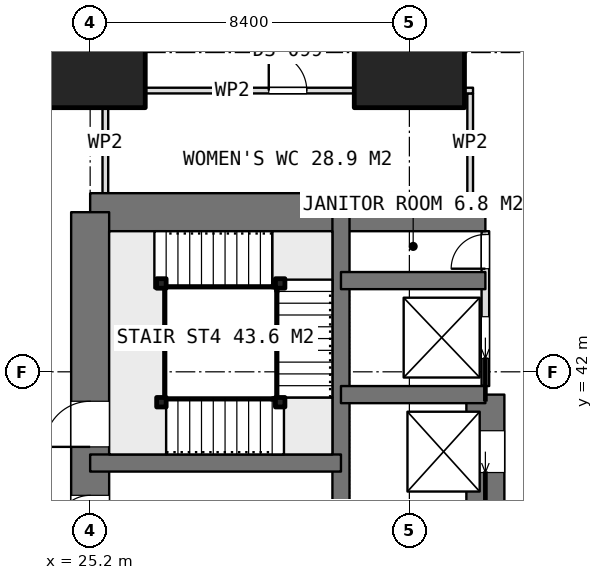
"""IFC4 building model, lengths in metres.
Left out: names, types, materials, properties, quantities, classifications, styles, units other than length and angle.
Written with IfcOpenShell. Run it as: python <this file> out.ifc"""

import sys

from ifc_helpers import new_model, si_unit, direction, frame, frame_2d, origin, origin_2d, place, context, subcontext, project, spatial, rectangle, extrude, element, fill, save


model = new_model("IFC4")
c1 = context("Model", 3, precision=1e-05, world=origin(), true_north=direction((0.0, 1.0)))
c2 = subcontext(c1, "Body", "Model", "MODEL_VIEW")
j1 = project(units=[si_unit("LENGTHUNIT", "METRE"), si_unit("PLANEANGLEUNIT", "RADIAN")], contexts=[c1])
p1 = place(None, origin())
s1 = spatial("IfcSite", under=j1, at=p1, CompositionType="ELEMENT")
p2 = place(p1, origin())
s2 = spatial("IfcBuilding", under=s1, at=p2, CompositionType="ELEMENT")
p3 = place(p2, frame((0.0, 0.0, 95.3)))
s3 = spatial("IfcBuildingStorey", under=s2, at=p3, CompositionType="ELEMENT", Elevation=95.3)
p4 = place(p3, frame((25.2, 46.2, 0.0), z_axis=(0.0, 0.0, 1.0), x_axis=(1.0, 0.0, 0.0)))
e1 = element("IfcWall", 1, at=p4, inside=s3, PredefinedType="SHEAR", context=c2, shape_type="SweptSolid", body=[
    extrude(rectangle(XDim=10.4, YDim=1.0, at=frame_2d((5.2, 0.0))), origin(), (0.0, 0.0, 1.0), 3.75),
])
p5 = place(p3, frame((25.2, 21.0, 0.0), z_axis=(0.0, 0.0, 1.0), x_axis=(0.0, 1.0, 0.0)))
e2 = element("IfcWall", 2, at=p5, inside=s3, PredefinedType="SHEAR", context=c2, shape_type="SweptSolid", body=[
    extrude(rectangle(XDim=25.2, YDim=1.0, at=frame_2d((12.6, 0.0))), origin(), (0.0, 0.0, 1.0), 3.75),
])
p6 = place(p5, frame((7.8, 0.0, 0.0)))
e3 = element("IfcOpeningElement", 3, at=p6, cuts=e2, PredefinedType="OPENING", context=c2, shape_type="SweptSolid", body=[
    extrude(rectangle(XDim=1.2, YDim=2.1, at=frame_2d((0.6, 1.05))), frame((0.0, 0.51, 0.0), z_axis=(0.0, -1.0, 0.0), x_axis=(1.0, 0.0, 0.0)), (0.0, 0.0, 1.0), 1.02),
])
p7 = place(p5, frame((14.25, 0.0, 0.0)))
e4 = element("IfcOpeningElement", 4, at=p7, cuts=e2, PredefinedType="OPENING", context=c2, shape_type="SweptSolid", body=[
    extrude(rectangle(XDim=0.9, YDim=2.1, at=frame_2d((0.45, 1.05))), frame((0.0, 0.51, 0.0), z_axis=(0.0, -1.0, 0.0), x_axis=(1.0, 0.0, 0.0)), (0.0, 0.0, 1.0), 1.02),
])
p8 = place(p5, frame((16.85, 0.0, 0.0)))
e5 = element("IfcOpeningElement", 5, at=p8, cuts=e2, PredefinedType="OPENING", context=c2, shape_type="SweptSolid", body=[
    extrude(rectangle(XDim=0.9, YDim=2.1, at=frame_2d((0.45, 1.05))), frame((0.0, 0.51, 0.0), z_axis=(0.0, -1.0, 0.0), x_axis=(1.0, 0.0, 0.0)), (0.0, 0.0, 1.0), 1.02),
])
p9 = place(p5, frame((19.025, 0.0, 0.0)))
e6 = element("IfcOpeningElement", 6, at=p9, cuts=e2, PredefinedType="OPENING", context=c2, shape_type="SweptSolid", body=[
    extrude(rectangle(XDim=1.2, YDim=2.1, at=frame_2d((0.6, 1.05))), frame((0.0, 0.51, 0.0), z_axis=(0.0, -1.0, 0.0), x_axis=(1.0, 0.0, 0.0)), (0.0, 0.0, 1.0), 1.02),
])
p10 = place(p3, frame((31.8, 21.0, 0.0), z_axis=(0.0, 0.0, 1.0), x_axis=(0.0, 1.0, 0.0)))
e7 = element("IfcWall", 7, at=p10, inside=s3, PredefinedType="SHEAR", context=c2, shape_type="SweptSolid", body=[
    extrude(rectangle(XDim=25.2, YDim=0.45, at=frame_2d((12.6, 0.0))), origin(), (0.0, 0.0, 1.0), 3.75),
])
p11 = place(p3, frame((35.6, 23.4, 0.0), z_axis=(0.0, 0.0, 1.0), x_axis=(0.0, 1.0, 0.0)))
e8 = element("IfcWall", 8, at=p11, inside=s3, PredefinedType="SHEAR", context=c2, shape_type="SweptSolid", body=[
    extrude(rectangle(XDim=18.0, YDim=1.0, at=frame_2d((9.0, 0.0))), origin(), (0.0, 0.0, 1.0), 3.75),
])
p12 = place(p11, frame((0.95, 0.0, 0.0)))
e9 = element("IfcOpeningElement", 9, at=p12, cuts=e8, PredefinedType="OPENING", context=c2, shape_type="SweptSolid", body=[
    extrude(rectangle(XDim=1.1, YDim=2.1, at=frame_2d((0.55, 1.05))), frame((0.0, 0.51, 0.0), z_axis=(0.0, -1.0, 0.0), x_axis=(1.0, 0.0, 0.0)), (0.0, 0.0, 1.0), 1.02),
])
p13 = place(p11, frame((3.95, 0.0, 0.0)))
e10 = element("IfcOpeningElement", 10, at=p13, cuts=e8, PredefinedType="OPENING", context=c2, shape_type="SweptSolid", body=[
    extrude(rectangle(XDim=1.1, YDim=2.1, at=frame_2d((0.55, 1.05))), frame((0.0, 0.51, 0.0), z_axis=(0.0, -1.0, 0.0), x_axis=(1.0, 0.0, 0.0)), (0.0, 0.0, 1.0), 1.02),
])
p14 = place(p11, frame((6.95, 0.0, 0.0)))
e11 = element("IfcOpeningElement", 11, at=p14, cuts=e8, PredefinedType="OPENING", context=c2, shape_type="SweptSolid", body=[
    extrude(rectangle(XDim=1.1, YDim=2.1, at=frame_2d((0.55, 1.05))), frame((0.0, 0.51, 0.0), z_axis=(0.0, -1.0, 0.0), x_axis=(1.0, 0.0, 0.0)), (0.0, 0.0, 1.0), 1.02),
])
p15 = place(p11, frame((9.95, 0.0, 0.0)))
e12 = element("IfcOpeningElement", 12, at=p15, cuts=e8, PredefinedType="OPENING", context=c2, shape_type="SweptSolid", body=[
    extrude(rectangle(XDim=1.1, YDim=2.1, at=frame_2d((0.55, 1.05))), frame((0.0, 0.51, 0.0), z_axis=(0.0, -1.0, 0.0), x_axis=(1.0, 0.0, 0.0)), (0.0, 0.0, 1.0), 1.02),
])
p16 = place(p11, frame((12.95, 0.0, 0.0)))
e13 = element("IfcOpeningElement", 13, at=p16, cuts=e8, PredefinedType="OPENING", context=c2, shape_type="SweptSolid", body=[
    extrude(rectangle(XDim=1.1, YDim=2.1, at=frame_2d((0.55, 1.05))), frame((0.0, 0.51, 0.0), z_axis=(0.0, -1.0, 0.0), x_axis=(1.0, 0.0, 0.0)), (0.0, 0.0, 1.0), 1.02),
])
p17 = place(p11, frame((15.95, 0.0, 0.0)))
e14 = element("IfcOpeningElement", 14, at=p17, cuts=e8, PredefinedType="OPENING", context=c2, shape_type="SweptSolid", body=[
    extrude(rectangle(XDim=1.1, YDim=2.1, at=frame_2d((0.55, 1.05))), frame((0.0, 0.51, 0.0), z_axis=(0.0, -1.0, 0.0), x_axis=(1.0, 0.0, 0.0)), (0.0, 0.0, 1.0), 1.02),
])
for number, where, z_axis, x_axis in (
    (15, (31.8, 41.4, 0.0), (0.0, 0.0, 1.0), (1.0, 0.0, 0.0)),
    (16, (31.8, 44.4, 0.0), (0.0, 0.0, 1.0), (1.0, 0.0, 0.0)),
):
    element("IfcWall", number, at=place(p3, frame(where, z_axis=z_axis, x_axis=x_axis)), inside=s3, PredefinedType="SHEAR", context=c2, shape_type="SweptSolid", body=[
        extrude(rectangle(XDim=3.8, YDim=0.45, at=frame_2d((1.9, 0.0))), origin(), (0.0, 0.0, 1.0), 3.75),
    ])
p18 = place(p3, frame((25.2, 39.6, 0.0), z_axis=(0.0, 0.0, 1.0), x_axis=(1.0, 0.0, 0.0)))
e17 = element("IfcWall", 17, at=p18, inside=s3, PredefinedType="SHEAR", context=c2, shape_type="SweptSolid", body=[
    extrude(rectangle(XDim=6.6, YDim=0.45, at=frame_2d((3.3, 0.0))), origin(), (0.0, 0.0, 1.0), 3.75),
])
for number, where, z_axis, x_axis in (
    (18, (25.2, 50.4, 0.0), (0.0, 0.0, 1.0), (1.0, 0.0, 0.0)),
    (19, (33.6, 50.4, 0.0), (0.0, 0.0, 1.0), (1.0, 0.0, 0.0)),
):
    element("IfcColumn", number, at=place(p3, frame(where, z_axis=z_axis, x_axis=x_axis)), inside=s3, PredefinedType="COLUMN", context=c2, shape_type="SweptSolid", body=[
        extrude(rectangle(XDim=2.9, YDim=2.9, at=origin_2d()), origin(), (0.0, 0.0, 1.0), 3.75),
    ])
p19 = place(p3, frame((35.6, 41.625, 0.0), z_axis=(0.0, 0.0, 1.0), x_axis=(0.0, 1.0, 0.0)))
e20 = element("IfcWall", 20, at=p19, inside=s3, PredefinedType="PARTITIONING", context=c2, shape_type="SweptSolid", body=[
    extrude(rectangle(XDim=4.075, YDim=0.2, at=frame_2d((2.038, 0.0))), origin(), (0.0, 0.0, 1.0), 3.5),
])
p20 = place(p19, frame((3.088, 0.0, 0.0)))
e21 = element("IfcOpeningElement", 21, at=p20, cuts=e20, PredefinedType="OPENING", context=c2, shape_type="SweptSolid", body=[
    extrude(rectangle(XDim=0.9, YDim=2.1, at=frame_2d((0.45, 1.05))), frame((0.0, 0.11, 0.0), z_axis=(0.0, -1.0, 0.0), x_axis=(1.0, 0.0, 0.0)), (0.0, 0.0, 1.0), 0.22),
])
p21 = place(p19, frame((0.725, 0.0, 0.0)))
e22 = element("IfcOpeningElement", 22, at=p21, cuts=e20, PredefinedType="OPENING", context=c2, shape_type="SweptSolid", body=[
    extrude(rectangle(XDim=1.1, YDim=2.1, at=frame_2d((0.55, 1.05))), frame((0.0, 0.11, 0.0), z_axis=(0.0, -1.0, 0.0), x_axis=(1.0, 0.0, 0.0)), (0.0, 0.0, 1.0), 0.22),
])
p22 = place(p3, frame((25.525, 49.4, 0.0), z_axis=(0.0, 0.0, 1.0), x_axis=(1.0, 0.0, 0.0)))
e23 = element("IfcWall", 23, at=p22, inside=s3, PredefinedType="PARTITIONING", context=c2, shape_type="SweptSolid", body=[
    extrude(rectangle(XDim=9.75, YDim=0.15, at=frame_2d((4.875, 0.0))), origin(), (0.0, 0.0, 1.0), 3.5),
])
p23 = place(p22, frame((4.375, 0.0, 0.0)))
e24 = element("IfcOpeningElement", 24, at=p23, cuts=e23, PredefinedType="OPENING", context=c2, shape_type="SweptSolid", body=[
    extrude(rectangle(XDim=1.0, YDim=2.1, at=frame_2d((0.5, 1.05))), frame((0.0, 0.085, 0.0), z_axis=(0.0, -1.0, 0.0), x_axis=(1.0, 0.0, 0.0)), (0.0, 0.0, 1.0), 0.17),
])
for number, where, z_axis, x_axis in (
    (25, (25.6, 46.7, 0.0), (0.0, 0.0, 1.0), (0.0, 1.0, 0.0)),
    (26, (35.2, 46.7, 0.0), (0.0, 0.0, 1.0), (0.0, 1.0, 0.0)),
):
    element("IfcWall", number, at=place(p3, frame(where, z_axis=z_axis, x_axis=x_axis)), inside=s3, PredefinedType="PARTITIONING", context=c2, shape_type="SweptSolid", body=[
        extrude(rectangle(XDim=2.625, YDim=0.15, at=frame_2d((1.312, 0.0))), origin(), (0.0, 0.0, 1.0), 3.5),
    ])
for number, where, z_axis, x_axis in (
    (27, (27.075, 41.2, 0.0), (0.0, 0.0, 1.0), (1.0, 0.0, 0.0)),
    (28, (30.2, 41.2, 0.0), (0.0, 0.0, 1.0), (1.0, 0.0, 0.0)),
    (29, (30.2, 44.325, 0.0), (0.0, 0.0, 1.0), (1.0, 0.0, 0.0)),
    (30, (27.075, 44.325, 0.0), (0.0, 0.0, 1.0), (1.0, 0.0, 0.0)),
):
    element("IfcColumn", number, at=place(p3, frame(where, z_axis=z_axis, x_axis=x_axis)), inside=s3, PredefinedType="COLUMN", context=c2, shape_type="SweptSolid", body=[
        extrude(rectangle(XDim=0.25, YDim=0.25, at=origin_2d()), origin(), (0.0, 0.0, 1.0), 3.75),
    ])
p24 = place(p8, origin())
e31 = element("IfcDoor", 31, at=p24, inside=s3, OperationType="SINGLE_SWING_LEFT", PredefinedType="DOOR", context=c2, shape_type="SweptSolid", body=[
    extrude(rectangle(XDim=0.9, YDim=2.1, at=frame_2d((0.45, 1.05))), frame((0.0, 0.025, 0.0), z_axis=(0.0, -1.0, 0.0), x_axis=(1.0, 0.0, 0.0)), (0.0, 0.0, 1.0), 0.05),
])
fill(e5, e31)
p25 = place(p20, origin())
e32 = element("IfcDoor", 32, at=p25, inside=s3, OperationType="SINGLE_SWING_LEFT", PredefinedType="DOOR", context=c2, shape_type="SweptSolid", body=[
    extrude(rectangle(XDim=0.9, YDim=2.1, at=frame_2d((0.45, 1.05))), frame((0.0, 0.025, 0.0), z_axis=(0.0, -1.0, 0.0), x_axis=(1.0, 0.0, 0.0)), (0.0, 0.0, 1.0), 0.05),
])
fill(e21, e32)
p26 = place(p17, origin())
e33 = element("IfcDoor", 33, at=p26, inside=s3, OperationType="SLIDING_TO_LEFT", PredefinedType="USERDEFINED", context=c2, shape_type="SweptSolid", body=[
    extrude(rectangle(XDim=1.1, YDim=2.1, at=frame_2d((0.55, 1.05))), frame((0.0, 0.025, 0.0), z_axis=(0.0, -1.0, 0.0), x_axis=(1.0, 0.0, 0.0)), (0.0, 0.0, 1.0), 0.05),
])
fill(e14, e33)
p27 = place(p21, origin())
e34 = element("IfcDoor", 34, at=p27, inside=s3, OperationType="SLIDING_TO_LEFT", PredefinedType="USERDEFINED", context=c2, shape_type="SweptSolid", body=[
    extrude(rectangle(XDim=1.1, YDim=2.1, at=frame_2d((0.55, 1.05))), frame((0.0, 0.025, 0.0), z_axis=(0.0, -1.0, 0.0), x_axis=(1.0, 0.0, 0.0)), (0.0, 0.0, 1.0), 0.05),
])
fill(e22, e34)
p28 = place(p23, origin())
e35 = element("IfcDoor", 35, at=p28, inside=s3, OperationType="SINGLE_SWING_LEFT", PredefinedType="DOOR", context=c2, shape_type="SweptSolid", body=[
    extrude(rectangle(XDim=1.0, YDim=2.1, at=frame_2d((0.5, 1.05))), frame((0.0, 0.025, 0.0), z_axis=(0.0, -1.0, 0.0), x_axis=(1.0, 0.0, 0.0)), (0.0, 0.0, 1.0), 0.05),
])
fill(e24, e35)
p29 = place(p9, origin())
e36 = element("IfcDoor", 36, at=p29, inside=s3, OperationType="SINGLE_SWING_RIGHT", PredefinedType="DOOR", context=c2, shape_type="SweptSolid", body=[
    extrude(rectangle(XDim=1.2, YDim=2.1, at=frame_2d((0.6, 1.05))), frame((0.0, 0.025, 0.0), z_axis=(0.0, -1.0, 0.0), x_axis=(1.0, 0.0, 0.0)), (0.0, 0.0, 1.0), 0.05),
])
fill(e6, e36)
save(model, sys.argv[1])
